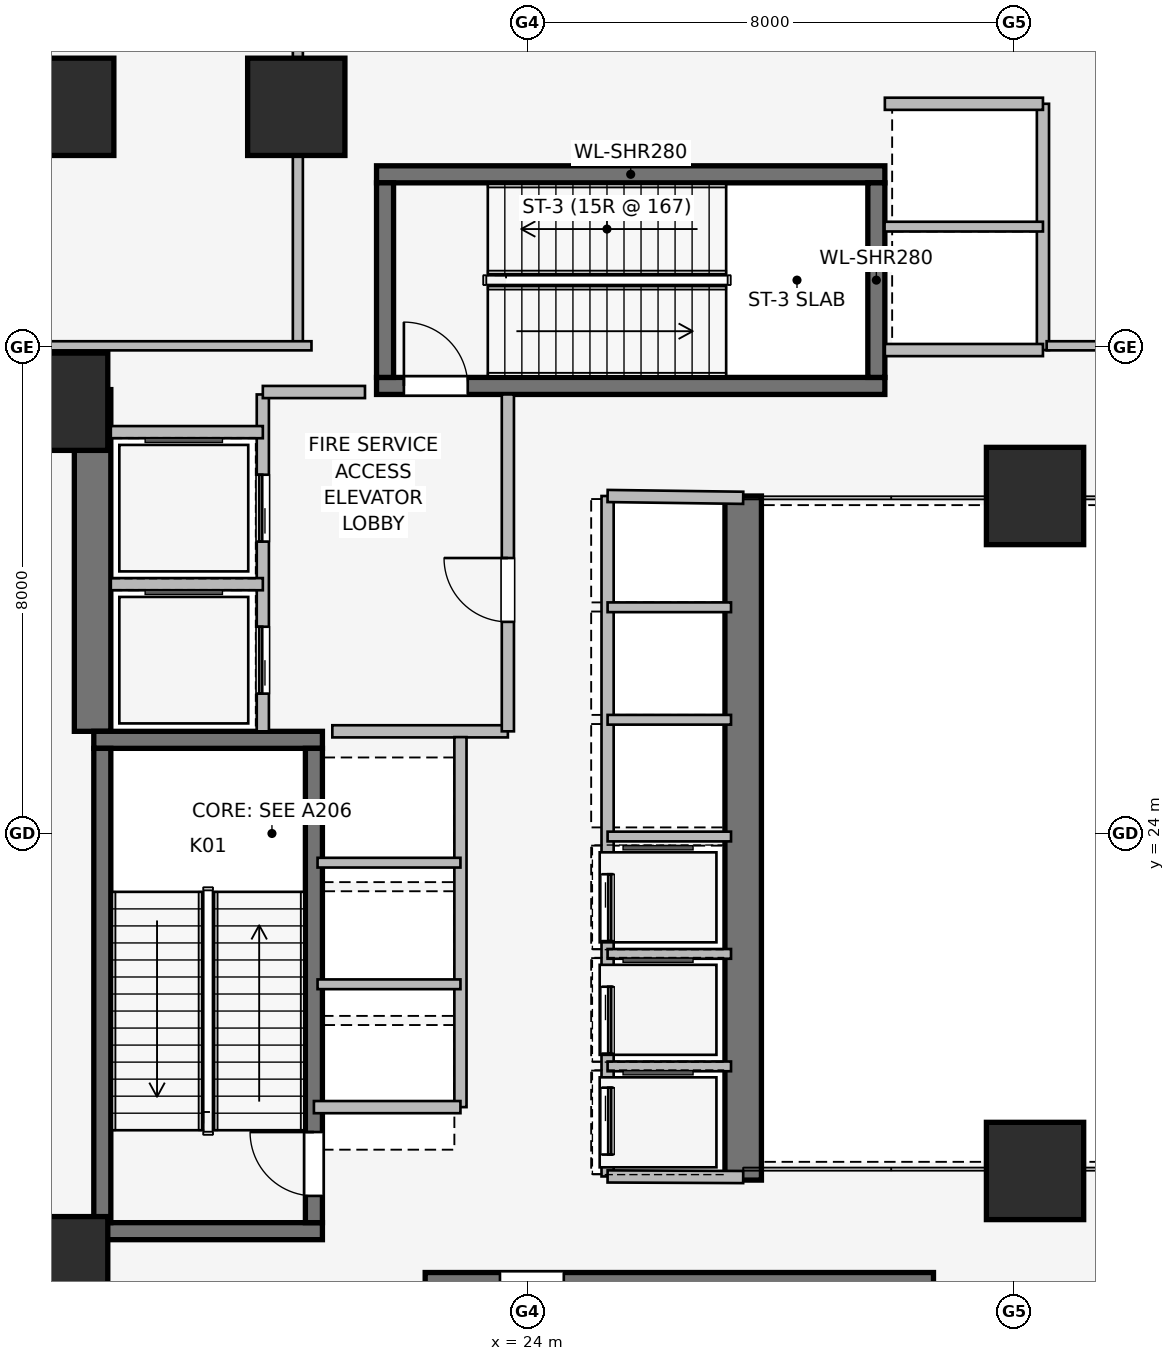
"""IFC4 building model, lengths in metres.
Left out: names, types, materials, properties, quantities, classifications, styles, units other than length and angle.
Written with IfcOpenShell. Run it as: python <this file> out.ifc"""

import sys

from ifc_helpers import new_model, si_unit, direction, frame, frame_2d, origin, origin_2d, place, context, subcontext, project, spatial, rectangle, extrude, element, fill, save


model = new_model("IFC4")
c1 = context("Model", 3, precision=1e-05, world=origin(), true_north=direction((0.0, 1.0)))
c2 = subcontext(c1, "Body", "Model", "MODEL_VIEW")
j1 = project(units=[si_unit("LENGTHUNIT", "METRE"), si_unit("PLANEANGLEUNIT", "RADIAN")], contexts=[c1])
p1 = place(None, origin())
s1 = spatial("IfcSite", under=j1, at=p1, CompositionType="ELEMENT")
p2 = place(p1, origin())
s2 = spatial("IfcBuilding", under=s1, at=p2, CompositionType="ELEMENT")
p3 = place(p2, frame((0.0, 0.0, 16.0)))
s3 = spatial("IfcBuildingStorey", under=s2, at=p3, CompositionType="ELEMENT", Elevation=16.0)
p4 = place(p3, frame((16.85, 25.68, 0.0), z_axis=(0.0, 0.0, 1.0), x_axis=(0.0, 1.0, 0.0)))
e1 = element("IfcWall", 1, at=p4, inside=s3, PredefinedType="SHEAR", context=c2, shape_type="SweptSolid", body=[
    extrude(rectangle(XDim=5.62, YDim=0.6, at=frame_2d((2.81, 0.0))), origin(), (0.0, 0.0, 1.0), 5.0),
])
p5 = place(p3, frame((27.55, 29.55, 0.0), z_axis=(0.0, 0.0, 1.0), x_axis=(0.0, -1.0, 0.0)))
e2 = element("IfcWall", 2, at=p5, inside=s3, PredefinedType="SHEAR", context=c2, shape_type="SweptSolid", body=[
    extrude(rectangle(XDim=11.25, YDim=0.6, at=frame_2d((5.625, 0.0))), origin(), (0.0, 0.0, 1.0), 5.0),
])
for number, where, z_axis, x_axis in (
    (3, (16.87, 17.46, 0.0), (0.0, 0.0, 1.0), (1.0, 0.0, 0.0)),
    (4, (20.63, 25.54, 0.0), (0.0, 0.0, 1.0), (-1.0, 0.0, 0.0)),
):
    element("IfcWall", number, at=place(p3, frame(where, z_axis=z_axis, x_axis=x_axis)), inside=s3, PredefinedType="SHEAR", context=c2, shape_type="SweptSolid", body=[
        extrude(rectangle(XDim=3.76, YDim=0.28, at=frame_2d((1.88, 0.0))), origin(), (0.0, 0.0, 1.0), 5.0),
    ])
p6 = place(p3, frame((17.01, 25.4, 0.0), z_axis=(0.0, 0.0, 1.0), x_axis=(0.0, -1.0, 0.0)))
e5 = element("IfcWall", 5, at=p6, inside=s3, PredefinedType="SHEAR", context=c2, shape_type="SweptSolid", body=[
    extrude(rectangle(XDim=7.8, YDim=0.28, at=frame_2d((3.9, 0.0))), origin(), (0.0, 0.0, 1.0), 5.0),
])
p7 = place(p3, frame((20.49, 17.6, 0.0), z_axis=(0.0, 0.0, 1.0), x_axis=(0.0, 1.0, 0.0)))
e6 = element("IfcWall", 6, at=p7, inside=s3, PredefinedType="SHEAR", context=c2, shape_type="SweptSolid", body=[
    extrude(rectangle(XDim=7.8, YDim=0.28, at=frame_2d((3.9, 0.0))), origin(), (0.0, 0.0, 1.0), 5.0),
])
p8 = place(p7, frame((0.44, 0.0, 0.0)))
e7 = element("IfcOpeningElement", 7, at=p8, cuts=e6, PredefinedType="OPENING", context=c2, shape_type="SweptSolid", body=[
    extrude(rectangle(XDim=1.05, YDim=2.0, at=frame_2d((0.525, 1.0))), frame((0.0, 0.15, 0.0), z_axis=(0.0, -1.0, 0.0), x_axis=(1.0, 0.0, 0.0)), (0.0, 0.0, 1.0), 0.3),
])
p9 = place(p3, frame((30.68, 16.64, 0.0), z_axis=(0.0, 0.0, 1.0), x_axis=(-1.0, 0.0, 0.0)))
e8 = element("IfcWall", 8, at=p9, inside=s3, PredefinedType="SHEAR", context=c2, shape_type="SweptSolid", body=[
    extrude(rectangle(XDim=8.36, YDim=0.28, at=frame_2d((4.18, 0.0))), origin(), (0.0, 0.0, 1.0), 5.0),
])
p10 = place(p9, frame((6.08, 0.0, 0.0)))
e9 = element("IfcOpeningElement", 9, at=p10, cuts=e8, PredefinedType="OPENING", context=c2, shape_type="SweptSolid", body=[
    extrude(rectangle(XDim=1.05, YDim=2.0, at=frame_2d((0.525, 1.0))), frame((0.0, 0.15, 0.0), z_axis=(0.0, -1.0, 0.0), x_axis=(1.0, 0.0, 0.0)), (0.0, 0.0, 1.0), 0.3),
])
p11 = place(p3, frame((21.52, 31.36, 0.0), z_axis=(0.0, 0.0, 1.0), x_axis=(1.0, 0.0, 0.0)))
e10 = element("IfcWall", 10, at=p11, inside=s3, PredefinedType="SHEAR", context=c2, shape_type="SweptSolid", body=[
    extrude(rectangle(XDim=8.36, YDim=0.28, at=frame_2d((4.18, 0.0))), origin(), (0.0, 0.0, 1.0), 5.0),
])
p12 = place(p11, frame((0.45, 0.0, 0.0)))
e11 = element("IfcOpeningElement", 11, at=p12, cuts=e10, PredefinedType="OPENING", context=c2, shape_type="SweptSolid", body=[
    extrude(rectangle(XDim=1.05, YDim=2.0, at=frame_2d((0.525, 1.0))), frame((0.0, 0.15, 0.0), z_axis=(0.0, -1.0, 0.0), x_axis=(1.0, 0.0, 0.0)), (0.0, 0.0, 1.0), 0.3),
])
p13 = place(p3, frame((29.88, 34.84, 0.0), z_axis=(0.0, 0.0, 1.0), x_axis=(-1.0, 0.0, 0.0)))
e12 = element("IfcWall", 12, at=p13, inside=s3, PredefinedType="SHEAR", context=c2, shape_type="SweptSolid", body=[
    extrude(rectangle(XDim=8.36, YDim=0.28, at=frame_2d((4.18, 0.0))), origin(), (0.0, 0.0, 1.0), 5.0),
])
for number, where, z_axis, x_axis in (
    (13, (21.66, 34.7, 0.0), (0.0, 0.0, 1.0), (0.0, -1.0, 0.0)),
    (14, (29.74, 31.5, 0.0), (0.0, 0.0, 1.0), (0.0, 1.0, 0.0)),
):
    element("IfcWall", number, at=place(p3, frame(where, z_axis=z_axis, x_axis=x_axis)), inside=s3, PredefinedType="SHEAR", context=c2, shape_type="SweptSolid", body=[
        extrude(rectangle(XDim=3.2, YDim=0.28, at=frame_2d((1.6, 0.0))), origin(), (0.0, 0.0, 1.0), 5.0),
    ])
for number, where, z_axis, x_axis in (
    (15, (16.3, 16.9, 0.0), (0.0, 0.0, 1.0), (1.0, 0.0, 0.0)),
    (16, (16.3, 31.1, 0.0), (0.0, 0.0, 1.0), (1.0, 0.0, 0.0)),
    (17, (32.35, 18.45, 0.0), (0.0, 0.0, 1.0), (1.0, 0.0, 0.0)),
    (18, (32.35, 29.55, 0.0), (0.0, 0.0, 1.0), (1.0, 0.0, 0.0)),
    (19, (20.2, 35.95, 0.0), (0.0, 0.0, 1.0), (1.0, 0.0, 0.0)),
    (20, (16.4, 35.95, 0.0), (0.0, 0.0, 1.0), (1.0, 0.0, 0.0)),
):
    element("IfcColumn", number, at=place(p3, frame(where, z_axis=z_axis, x_axis=x_axis)), inside=s3, PredefinedType="COLUMN", context=c2, shape_type="SweptSolid", body=[
        extrude(rectangle(XDim=1.6, YDim=1.6, at=origin_2d()), origin(), (0.0, 0.0, 1.0), 5.0),
    ])
p14 = place(p3, frame((19.65, 25.68, 0.0), z_axis=(0.0, 0.0, 1.0), x_axis=(0.0, 1.0, 0.0)))
e21 = element("IfcWall", 21, at=p14, inside=s3, PredefinedType="PARTITIONING", context=c2, shape_type="SweptSolid", body=[
    extrude(rectangle(XDim=5.54, YDim=0.2, at=frame_2d((2.77, 0.0))), origin(), (0.0, 0.0, 1.0), 4.58),
])
p15 = place(p14, frame((0.62, 0.0, 0.0)))
e22 = element("IfcOpeningElement", 22, at=p15, cuts=e21, PredefinedType="OPENING", context=c2, shape_type="SweptSolid", body=[
    extrude(rectangle(XDim=1.1, YDim=2.2, at=frame_2d((0.55, 1.1))), frame((0.0, 0.11, 0.0), z_axis=(0.0, -1.0, 0.0), x_axis=(1.0, 0.0, 0.0)), (0.0, 0.0, 1.0), 0.22),
])
p16 = place(p14, frame((3.12, 0.0, 0.0)))
e23 = element("IfcOpeningElement", 23, at=p16, cuts=e21, PredefinedType="OPENING", context=c2, shape_type="SweptSolid", body=[
    extrude(rectangle(XDim=1.1, YDim=2.2, at=frame_2d((0.55, 1.1))), frame((0.0, 0.11, 0.0), z_axis=(0.0, -1.0, 0.0), x_axis=(1.0, 0.0, 0.0)), (0.0, 0.0, 1.0), 0.22),
])
p17 = place(p3, frame((20.793, 25.68, 0.0), z_axis=(0.0, 0.0, 1.0), x_axis=(1.0, 0.0, 0.0)))
e24 = element("IfcWall", 24, at=p17, inside=s3, PredefinedType="PARTITIONING", context=c2, shape_type="SweptSolid", body=[
    extrude(rectangle(XDim=2.887, YDim=0.2, at=frame_2d((1.443, 0.0))), origin(), (0.0, 0.0, 1.0), 4.58),
])
p18 = place(p3, frame((23.68, 25.68, 0.0), z_axis=(0.0, 0.0, 1.0), x_axis=(0.0, 1.0, 0.0)))
e25 = element("IfcWall", 25, at=p18, inside=s3, PredefinedType="PARTITIONING", context=c2, shape_type="SweptSolid", body=[
    extrude(rectangle(XDim=5.54, YDim=0.2, at=frame_2d((2.77, 0.0))), origin(), (0.0, 0.0, 1.0), 4.58),
])
p19 = place(p18, frame((1.8, 0.0, 0.0)))
e26 = element("IfcOpeningElement", 26, at=p19, cuts=e25, PredefinedType="OPENING", context=c2, shape_type="SweptSolid", body=[
    extrude(rectangle(XDim=1.05, YDim=2.0, at=frame_2d((0.525, 1.0))), frame((0.0, 0.11, 0.0), z_axis=(0.0, -1.0, 0.0), x_axis=(1.0, 0.0, 0.0)), (0.0, 0.0, 1.0), 0.22),
])
p20 = place(p3, frame((21.33, 31.26, 0.0), z_axis=(0.0, 0.0, 1.0), x_axis=(-1.0, 0.0, 0.0)))
e27 = element("IfcWall", 27, at=p20, inside=s3, PredefinedType="PARTITIONING", context=c2, shape_type="SweptSolid", body=[
    extrude(rectangle(XDim=1.68, YDim=0.2, at=frame_2d((0.84, 0.0))), origin(), (0.0, 0.0, 1.0), 4.58),
])
p21 = place(p3, frame((17.15, 28.1, 0.0), z_axis=(0.0, 0.0, 1.0), x_axis=(1.0, 0.0, 0.0)))
e28 = element("IfcWall", 28, at=p21, inside=s3, PredefinedType="PARTITIONING", context=c2, shape_type="SweptSolid", body=[
    extrude(rectangle(XDim=2.5, YDim=0.2, at=frame_2d((1.25, 0.0))), origin(), (0.0, 0.0, 1.0), 4.58),
])
p22 = place(p3, frame((19.65, 30.6, 0.0), z_axis=(0.0, 0.0, 1.0), x_axis=(-1.0, 0.0, 0.0)))
e29 = element("IfcWall", 29, at=p22, inside=s3, PredefinedType="PARTITIONING", context=c2, shape_type="SweptSolid", body=[
    extrude(rectangle(XDim=2.5, YDim=0.2, at=frame_2d((1.25, 0.0))), origin(), (0.0, 0.0, 1.0), 3.48),
])
p23 = place(p3, frame((32.48, 31.95, 0.0), z_axis=(0.0, 0.0, 1.0), x_axis=(0.0, 1.0, 0.0)))
e30 = element("IfcWall", 30, at=p23, inside=s3, PredefinedType="PARTITIONING", context=c2, shape_type="SweptSolid", body=[
    extrude(rectangle(XDim=4.05, YDim=0.2, at=frame_2d((2.025, 0.0))), origin(), (0.0, 0.0, 1.0), 4.58),
])
p24 = place(p3, frame((29.88, 36.0, 0.0), z_axis=(0.0, 0.0, 1.0), x_axis=(1.0, 0.0, 0.0)))
e31 = element("IfcWall", 31, at=p24, inside=s3, PredefinedType="PARTITIONING", context=c2, shape_type="SweptSolid", body=[
    extrude(rectangle(XDim=2.6, YDim=0.2, at=frame_2d((1.3, 0.0))), origin(), (0.0, 0.0, 1.0), 3.632),
])
p25 = place(p3, frame((32.48, 31.95, 0.0), z_axis=(0.0, 0.0, 1.0), x_axis=(-1.0, 0.0, 0.0)))
e32 = element("IfcWall", 32, at=p25, inside=s3, PredefinedType="PARTITIONING", context=c2, shape_type="SweptSolid", body=[
    extrude(rectangle(XDim=2.6, YDim=0.2, at=frame_2d((1.3, 0.0))), origin(), (0.0, 0.0, 1.0), 4.58),
])
p26 = place(p3, frame((29.875, 33.98, 0.0), z_axis=(0.0, 0.0, 1.0), x_axis=(1.0, 0.0, 0.0)))
e33 = element("IfcWall", 33, at=p26, inside=s3, PredefinedType="PARTITIONING", context=c2, shape_type="SweptSolid", body=[
    extrude(rectangle(XDim=2.605, YDim=0.16, at=frame_2d((1.302, 0.0))), origin(), (0.0, 0.0, 1.0), 4.58),
])
p27 = place(p3, frame((22.9, 19.5, 0.0), z_axis=(0.0, 0.0, 1.0), x_axis=(0.0, 1.0, 0.0)))
e34 = element("IfcWall", 34, at=p27, inside=s3, PredefinedType="PARTITIONING", context=c2, shape_type="SweptSolid", body=[
    extrude(rectangle(XDim=6.085, YDim=0.2, at=frame_2d((3.042, 0.0))), origin(), (0.0, 0.0, 1.0), 4.58),
])
p28 = place(p3, frame((20.49, 19.5, 0.0), z_axis=(0.0, 0.0, 1.0), x_axis=(1.0, 0.0, 0.0)))
e35 = element("IfcWall", 35, at=p28, inside=s3, PredefinedType="PARTITIONING", context=c2, shape_type="SweptSolid", body=[
    extrude(rectangle(XDim=2.41, YDim=0.2, at=frame_2d((1.205, 0.0))), origin(), (0.0, 0.0, 1.0), 3.48),
])
for number, where, z_axis, x_axis in (
    (36, (20.55, 21.52, 0.0), (0.0, 0.0, 1.0), (1.0, 0.0, 0.0)),
    (37, (20.55, 23.52, 0.0), (0.0, 0.0, 1.0), (1.0, 0.0, 0.0)),
):
    element("IfcWall", number, at=place(p3, frame(where, z_axis=z_axis, x_axis=x_axis)), inside=s3, PredefinedType="PARTITIONING", context=c2, shape_type="SweptSolid", body=[
        extrude(rectangle(XDim=2.35, YDim=0.16, at=frame_2d((1.175, 0.0))), origin(), (0.0, 0.0, 1.0), 4.58),
    ])
p29 = place(p3, frame((25.32, 29.55, 0.0), z_axis=(0.0, 0.0, 1.0), x_axis=(0.0, -1.0, 0.0)))
e38 = element("IfcWall", 38, at=p29, inside=s3, PredefinedType="PARTITIONING", context=c2, shape_type="SweptSolid", body=[
    extrude(rectangle(XDim=11.19, YDim=0.2, at=frame_2d((5.595, 0.0))), origin(), (0.0, 0.0, 1.0), 4.58),
])
p30 = place(p29, frame((6.22, 0.0, 0.0)))
e39 = element("IfcOpeningElement", 39, at=p30, cuts=e38, PredefinedType="OPENING", context=c2, shape_type="SweptSolid", body=[
    extrude(rectangle(XDim=1.1, YDim=2.2, at=frame_2d((0.55, 1.1))), frame((0.0, 0.11, 0.0), z_axis=(0.0, -1.0, 0.0), x_axis=(1.0, 0.0, 0.0)), (0.0, 0.0, 1.0), 0.22),
])
p31 = place(p29, frame((8.07, 0.0, 0.0)))
e40 = element("IfcOpeningElement", 40, at=p31, cuts=e38, PredefinedType="OPENING", context=c2, shape_type="SweptSolid", body=[
    extrude(rectangle(XDim=1.1, YDim=2.2, at=frame_2d((0.55, 1.1))), frame((0.0, 0.11, 0.0), z_axis=(0.0, -1.0, 0.0), x_axis=(1.0, 0.0, 0.0)), (0.0, 0.0, 1.0), 0.22),
])
p32 = place(p29, frame((9.73, 0.0, 0.0)))
e41 = element("IfcOpeningElement", 41, at=p32, cuts=e38, PredefinedType="OPENING", context=c2, shape_type="SweptSolid", body=[
    extrude(rectangle(XDim=1.1, YDim=2.2, at=frame_2d((0.55, 1.1))), frame((0.0, 0.11, 0.0), z_axis=(0.0, -1.0, 0.0), x_axis=(1.0, 0.0, 0.0)), (0.0, 0.0, 1.0), 0.22),
])
p33 = place(p3, frame((25.32, 18.36, 0.0), z_axis=(0.0, 0.0, 1.0), x_axis=(0.999989925833, -0.004488678231, 0.0)))
e42 = element("IfcWall", 42, at=p33, inside=s3, PredefinedType="PARTITIONING", context=c2, shape_type="SweptSolid", body=[
    extrude(rectangle(XDim=2.23, YDim=0.2, at=frame_2d((1.115, 0.0))), origin(), (0.0, 0.0, 1.0), 4.58),
])
p34 = place(p3, frame((27.55, 29.52, 0.0), z_axis=(0.0, 0.0, 1.0), x_axis=(-0.999909343457, 0.013464949556, 0.0)))
e43 = element("IfcWall", 43, at=p34, inside=s3, PredefinedType="PARTITIONING", context=c2, shape_type="SweptSolid", body=[
    extrude(rectangle(XDim=2.23, YDim=0.2, at=frame_2d((1.115, 0.0))), origin(), (0.0, 0.0, 1.0), 3.48),
])
for number, where, z_axis, x_axis in (
    (44, (25.32, 20.17, 0.0), (0.0, 0.0, 1.0), (1.0, 0.0, 0.0)),
    (45, (25.32, 22.02, 0.0), (0.0, 0.0, 1.0), (1.0, 0.0, 0.0)),
    (46, (25.32, 23.95, 0.0), (0.0, 0.0, 1.0), (1.0, 0.0, 0.0)),
    (47, (25.32, 25.87, 0.0), (0.0, 0.0, 1.0), (1.0, 0.0, 0.0)),
    (48, (25.32, 27.72, 0.0), (0.0, 0.0, 1.0), (1.0, 0.0, 0.0)),
):
    element("IfcWall", number, at=place(p3, frame(where, z_axis=z_axis, x_axis=x_axis)), inside=s3, PredefinedType="PARTITIONING", context=c2, shape_type="SweptSolid", body=[
        extrude(rectangle(XDim=2.03, YDim=0.16, at=frame_2d((1.015, 0.0))), origin(), (0.0, 0.0, 1.0), 4.58),
    ])
p35 = place(p3, frame((20.226, 32.09, 0.0), z_axis=(0.0, 0.0, 1.0), x_axis=(0.0, 1.0, 0.0)))
e49 = element("IfcWall", 49, at=p35, inside=s3, PredefinedType="PARTITIONING", context=c2, shape_type="SweptSolid", body=[
    extrude(rectangle(XDim=15.54, YDim=0.165, at=frame_2d((7.77, 0.0))), origin(), (0.0, 0.0, 1.0), 4.58),
])
p36 = place(p3, frame((20.45, 32.02, 0.0), z_axis=(0.0, 0.0, 1.0), x_axis=(-1.0, 0.0, 0.0)))
e50 = element("IfcWall", 50, at=p36, inside=s3, PredefinedType="PARTITIONING", context=c2, shape_type="SweptSolid", body=[
    extrude(rectangle(XDim=20.055, YDim=0.15, at=frame_2d((10.027, 0.0))), origin(), (0.0, 0.0, 1.0), 3.632),
])
p37 = place(p36, frame((9.5, 0.0, 0.0)))
e51 = element("IfcOpeningElement", 51, at=p37, cuts=e50, PredefinedType="OPENING", context=c2, shape_type="SweptSolid", body=[
    extrude(rectangle(XDim=0.96, YDim=2.0, at=frame_2d((0.48, 1.0))), frame((0.0, 0.085, 0.0), z_axis=(0.0, -1.0, 0.0), x_axis=(1.0, 0.0, 0.0)), (0.0, 0.0, 1.0), 0.17),
])
p38 = place(p3, frame((40.187, 32.02, 0.0), z_axis=(0.0, 0.0, 1.0), x_axis=(-1.0, 0.0, 0.0)))
e52 = element("IfcWall", 52, at=p38, inside=s3, PredefinedType="PARTITIONING", context=c2, shape_type="SweptSolid", body=[
    extrude(rectangle(XDim=7.646, YDim=0.15, at=frame_2d((3.823, 0.0))), origin(), (0.0, 0.0, 1.0), 4.58),
])
p39 = place(p38, frame((3.343, 0.0, 0.0)))
e53 = element("IfcOpeningElement", 53, at=p39, cuts=e52, PredefinedType="OPENING", context=c2, shape_type="SweptSolid", body=[
    extrude(rectangle(XDim=0.96, YDim=2.0, at=frame_2d((0.48, 1.0))), frame((0.0, 0.085, 0.0), z_axis=(0.0, -1.0, 0.0), x_axis=(1.0, 0.0, 0.0)), (0.0, 0.0, 1.0), 0.17),
])
p40 = place(p8, origin())
e54 = element("IfcDoor", 54, at=p40, inside=s3, OperationType="SINGLE_SWING_RIGHT", PredefinedType="DOOR", context=c2, shape_type="SweptSolid", body=[
    extrude(rectangle(XDim=1.05, YDim=2.0, at=frame_2d((0.525, 1.0))), frame((0.0, 0.025, 0.0), z_axis=(0.0, -1.0, 0.0), x_axis=(1.0, 0.0, 0.0)), (0.0, 0.0, 1.0), 0.05),
])
fill(e7, e54)
p41 = place(p10, origin())
e55 = element("IfcDoor", 55, at=p41, inside=s3, OperationType="SINGLE_SWING_RIGHT", PredefinedType="DOOR", context=c2, shape_type="SweptSolid", body=[
    extrude(rectangle(XDim=1.05, YDim=2.0, at=frame_2d((0.525, 1.0))), frame((0.0, 0.025, 0.0), z_axis=(0.0, -1.0, 0.0), x_axis=(1.0, 0.0, 0.0)), (0.0, 0.0, 1.0), 0.05),
])
fill(e9, e55)
p42 = place(p12, origin())
e56 = element("IfcDoor", 56, at=p42, inside=s3, OperationType="SINGLE_SWING_LEFT", PredefinedType="DOOR", context=c2, shape_type="SweptSolid", body=[
    extrude(rectangle(XDim=1.05, YDim=2.0, at=frame_2d((0.525, 1.0))), frame((0.0, 0.025, 0.0), z_axis=(0.0, -1.0, 0.0), x_axis=(1.0, 0.0, 0.0)), (0.0, 0.0, 1.0), 0.05),
])
fill(e11, e56)
p43 = place(p15, origin())
e57 = element("IfcDoor", 57, at=p43, inside=s3, OperationType="SLIDING_TO_LEFT", PredefinedType="DOOR", context=c2, shape_type="SweptSolid", body=[
    extrude(rectangle(XDim=1.1, YDim=2.2, at=frame_2d((0.55, 1.1))), frame((0.0, 0.025, 0.0), z_axis=(0.0, -1.0, 0.0), x_axis=(1.0, 0.0, 0.0)), (0.0, 0.0, 1.0), 0.05),
])
fill(e22, e57)
p44 = place(p16, origin())
e58 = element("IfcDoor", 58, at=p44, inside=s3, OperationType="SLIDING_TO_LEFT", PredefinedType="DOOR", context=c2, shape_type="SweptSolid", body=[
    extrude(rectangle(XDim=1.1, YDim=2.2, at=frame_2d((0.55, 1.1))), frame((0.0, 0.025, 0.0), z_axis=(0.0, -1.0, 0.0), x_axis=(1.0, 0.0, 0.0)), (0.0, 0.0, 1.0), 0.05),
])
fill(e23, e58)
p45 = place(p19, origin())
e59 = element("IfcDoor", 59, at=p45, inside=s3, OperationType="SINGLE_SWING_RIGHT", PredefinedType="DOOR", context=c2, shape_type="SweptSolid", body=[
    extrude(rectangle(XDim=1.05, YDim=2.0, at=frame_2d((0.525, 1.0))), frame((0.0, 0.025, 0.0), z_axis=(0.0, -1.0, 0.0), x_axis=(1.0, 0.0, 0.0)), (0.0, 0.0, 1.0), 0.05),
])
fill(e26, e59)
p46 = place(p30, origin())
e60 = element("IfcDoor", 60, at=p46, inside=s3, OperationType="SLIDING_TO_LEFT", PredefinedType="DOOR", context=c2, shape_type="SweptSolid", body=[
    extrude(rectangle(XDim=1.1, YDim=2.2, at=frame_2d((0.55, 1.1))), frame((0.0, 0.025, 0.0), z_axis=(0.0, -1.0, 0.0), x_axis=(1.0, 0.0, 0.0)), (0.0, 0.0, 1.0), 0.05),
])
fill(e39, e60)
p47 = place(p31, origin())
e61 = element("IfcDoor", 61, at=p47, inside=s3, OperationType="SLIDING_TO_LEFT", PredefinedType="DOOR", context=c2, shape_type="SweptSolid", body=[
    extrude(rectangle(XDim=1.1, YDim=2.2, at=frame_2d((0.55, 1.1))), frame((0.0, 0.025, 0.0), z_axis=(0.0, -1.0, 0.0), x_axis=(1.0, 0.0, 0.0)), (0.0, 0.0, 1.0), 0.05),
])
fill(e40, e61)
p48 = place(p32, origin())
e62 = element("IfcDoor", 62, at=p48, inside=s3, OperationType="SLIDING_TO_LEFT", PredefinedType="DOOR", context=c2, shape_type="SweptSolid", body=[
    extrude(rectangle(XDim=1.1, YDim=2.2, at=frame_2d((0.55, 1.1))), frame((0.0, 0.025, 0.0), z_axis=(0.0, -1.0, 0.0), x_axis=(1.0, 0.0, 0.0)), (0.0, 0.0, 1.0), 0.05),
])
fill(e41, e62)
save(model, sys.argv[1])
